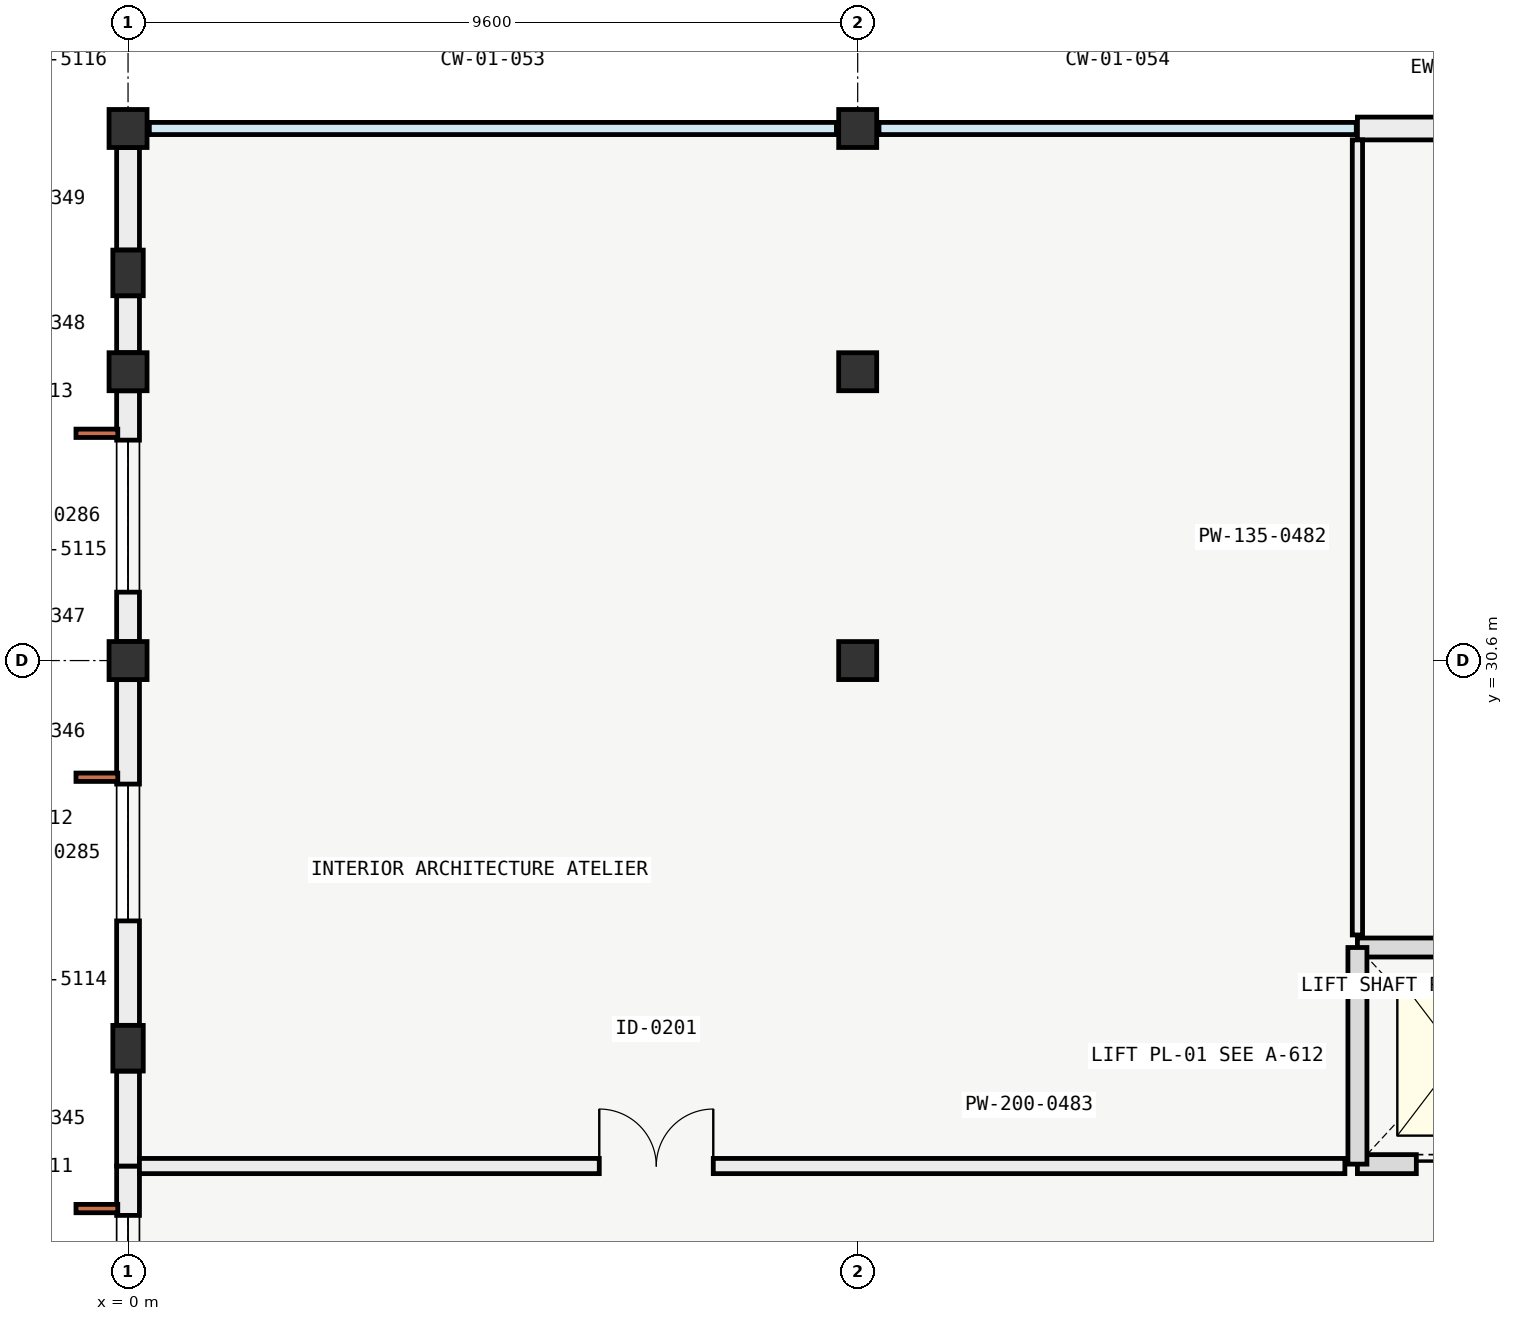
"""IFC4 building model, lengths in metres.
Left out: names, types, materials, properties, quantities, classifications, styles, units other than length and angle.
Written with IfcOpenShell. Run it as: python <this file> out.ifc"""

import sys

from ifc_helpers import new_model, si_unit, direction, frame, frame_2d, origin, origin_2d, place, context, subcontext, project, spatial, rectangle, extrude, element, fill, save


model = new_model("IFC4")
c1 = context("Model", 3, precision=1e-05, world=origin(), true_north=direction((0.0, 1.0)))
c2 = subcontext(c1, "Body", "Model", "MODEL_VIEW")
j1 = project(units=[si_unit("LENGTHUNIT", "METRE"), si_unit("PLANEANGLEUNIT", "RADIAN")], contexts=[c1])
p1 = place(None, origin())
s1 = spatial("IfcSite", under=j1, at=p1, CompositionType="ELEMENT")
p2 = place(p1, origin())
s2 = spatial("IfcBuilding", under=s1, at=p2, CompositionType="ELEMENT")
p3 = place(p2, frame((0.0, 0.0, 26.4)))
s3 = spatial("IfcBuildingStorey", under=s2, at=p3, CompositionType="ELEMENT", Elevation=26.4)
for number, where, z_axis, x_axis in (
    (1, (0.0, 30.6, 0.0), (0.0, 0.0, 1.0), (1.0, 0.0, 0.0)),
    (2, (0.0, 34.4, 0.0), (0.0, 0.0, 1.0), (1.0, 0.0, 0.0)),
    (3, (0.0, 37.6, 0.0), (0.0, 0.0, 1.0), (1.0, 0.0, 0.0)),
    (4, (9.6, 30.6, 0.0), (0.0, 0.0, 1.0), (1.0, 0.0, 0.0)),
    (5, (9.6, 34.4, 0.0), (0.0, 0.0, 1.0), (1.0, 0.0, 0.0)),
    (6, (9.6, 37.6, 0.0), (0.0, 0.0, 1.0), (1.0, 0.0, 0.0)),
):
    element("IfcColumn", number, at=place(p3, frame(where, z_axis=z_axis, x_axis=x_axis)), inside=s3, PredefinedType="COLUMN", context=c2, shape_type="SweptSolid", body=[
        extrude(rectangle(XDim=0.5, YDim=0.5, at=origin_2d()), origin(), (0.0, 0.0, 1.0), 4.2),
    ])
for number, where, z_axis, x_axis in (
    (7, (0.0, 25.5, 0.0), (0.0, 0.0, 1.0), (1.0, 0.0, 0.0)),
    (8, (0.0, 35.7, 0.0), (0.0, 0.0, 1.0), (1.0, 0.0, 0.0)),
):
    element("IfcColumn", number, at=place(p3, frame(where, z_axis=z_axis, x_axis=x_axis)), inside=s3, PredefinedType="PILASTER", context=c2, shape_type="SweptSolid", body=[
        extrude(rectangle(XDim=0.4, YDim=0.6, at=origin_2d()), origin(), (0.0, 0.0, 1.0), 4.2),
    ])
p4 = place(p3, frame((0.0, 20.651, 0.0), z_axis=(0.0, 0.0, 1.0), x_axis=(0.0, 1.0, 0.0)))
e9 = element("IfcWall", 9, at=p4, inside=s3, PredefinedType="SOLIDWALL", context=c2, shape_type="SweptSolid", body=[
    extrude(rectangle(XDim=3.299, YDim=0.3, at=frame_2d((1.649, 0.0))), origin(), (0.0, 0.0, 1.0), 3.25),
])
p5 = place(p4, frame((0.649, 0.0, 0.75)))
e10 = element("IfcOpeningElement", 10, at=p5, cuts=e9, PredefinedType="OPENING", context=c2, shape_type="SweptSolid", body=[
    extrude(rectangle(XDim=2.0, YDim=1.35, at=frame_2d((1.0, 0.675))), frame((0.0, 0.16, 0.0), z_axis=(0.0, -1.0, 0.0), x_axis=(1.0, 0.0, 0.0)), (0.0, 0.0, 1.0), 0.32),
])
p6 = place(p3, frame((0.0, 23.95, 0.0), z_axis=(0.0, 0.0, 1.0), x_axis=(0.0, 1.0, 0.0)))
e11 = element("IfcWall", 11, at=p6, inside=s3, PredefinedType="SOLIDWALL", context=c2, shape_type="SweptSolid", body=[
    extrude(rectangle(XDim=1.249, YDim=0.3, at=frame_2d((0.625, 0.0))), origin(), (0.0, 0.0, 1.0), 3.25),
])
p7 = place(p3, frame((0.0, 25.801, 0.0), z_axis=(0.0, 0.0, 1.0), x_axis=(0.0, 1.0, 0.0)))
e12 = element("IfcWall", 12, at=p7, inside=s3, PredefinedType="SOLIDWALL", context=c2, shape_type="SweptSolid", body=[
    extrude(rectangle(XDim=4.548, YDim=0.3, at=frame_2d((2.274, 0.0))), origin(), (0.0, 0.0, 1.0), 3.25),
])
p8 = place(p7, frame((1.374, 0.0, 0.85)))
e13 = element("IfcOpeningElement", 13, at=p8, cuts=e12, PredefinedType="OPENING", context=c2, shape_type="SweptSolid", body=[
    extrude(rectangle(XDim=1.8, YDim=2.1, at=frame_2d((0.9, 1.05))), frame((0.0, 0.16, 0.0), z_axis=(0.0, -1.0, 0.0), x_axis=(1.0, 0.0, 0.0)), (0.0, 0.0, 1.0), 0.32),
])
p9 = place(p3, frame((0.0, 30.851, 0.0), z_axis=(0.0, 0.0, 1.0), x_axis=(0.0, 1.0, 0.0)))
e14 = element("IfcWall", 14, at=p9, inside=s3, PredefinedType="SOLIDWALL", context=c2, shape_type="SweptSolid", body=[
    extrude(rectangle(XDim=3.298, YDim=0.3, at=frame_2d((1.649, 0.0))), origin(), (0.0, 0.0, 1.0), 2.355),
])
p10 = place(p9, frame((0.649, 0.0, 0.85)))
e15 = element("IfcOpeningElement", 15, at=p10, cuts=e14, PredefinedType="OPENING", context=c2, shape_type="SweptSolid", body=[
    extrude(rectangle(XDim=2.0, YDim=1.35, at=frame_2d((1.0, 0.675))), frame((0.0, 0.16, 0.0), z_axis=(0.0, -1.0, 0.0), x_axis=(1.0, 0.0, 0.0)), (0.0, 0.0, 1.0), 0.32),
])
p11 = place(p3, frame((0.0, 34.651, 0.0), z_axis=(0.0, 0.0, 1.0), x_axis=(0.0, 1.0, 0.0)))
e16 = element("IfcWall", 16, at=p11, inside=s3, PredefinedType="SOLIDWALL", context=c2, shape_type="SweptSolid", body=[
    extrude(rectangle(XDim=0.748, YDim=0.3, at=frame_2d((0.374, 0.0))), origin(), (0.0, 0.0, 1.0), 2.355),
])
p12 = place(p3, frame((0.0, 36.001, 0.0), z_axis=(0.0, 0.0, 1.0), x_axis=(0.0, 1.0, 0.0)))
e17 = element("IfcWall", 17, at=p12, inside=s3, PredefinedType="SOLIDWALL", context=c2, shape_type="SweptSolid", body=[
    extrude(rectangle(XDim=1.348, YDim=0.3, at=frame_2d((0.674, 0.0))), origin(), (0.0, 0.0, 1.0), 2.355),
])
p13 = place(p3, frame((16.175, 37.6, 0.0), z_axis=(0.0, 0.0, 1.0), x_axis=(1.0, 0.0, 0.0)))
e18 = element("IfcWall", 18, at=p13, inside=s3, PredefinedType="SOLIDWALL", context=c2, shape_type="SweptSolid", body=[
    extrude(rectangle(XDim=2.774, YDim=0.3, at=frame_2d((1.387, 0.0))), origin(), (0.0, 0.0, 1.0), 2.355),
])
p14 = place(p3, frame((16.175, 23.975, 0.0), z_axis=(0.0, 0.0, 1.0), x_axis=(1.0, 0.0, 0.0)))
e19 = element("IfcWall", 19, at=p14, inside=s3, PredefinedType="SOLIDWALL", context=c2, shape_type="SweptSolid", body=[
    extrude(rectangle(XDim=2.65, YDim=0.25, at=frame_2d((1.325, 0.0))), origin(), (0.0, 0.0, 1.0), 3.975),
])
p15 = place(p14, frame((0.775, 0.0, 0.0)))
e20 = element("IfcOpeningElement", 20, at=p15, cuts=e19, PredefinedType="OPENING", context=c2, shape_type="SweptSolid", body=[
    extrude(rectangle(XDim=1.1, YDim=2.1, at=frame_2d((0.55, 1.05))), frame((0.0, 0.135, 0.0), z_axis=(0.0, -1.0, 0.0), x_axis=(1.0, 0.0, 0.0)), (0.0, 0.0, 1.0), 0.27),
])
p16 = place(p3, frame((18.825, 26.825, 0.0), z_axis=(0.0, 0.0, 1.0), x_axis=(-1.0, 0.0, 0.0)))
e21 = element("IfcWall", 21, at=p16, inside=s3, PredefinedType="SOLIDWALL", context=c2, shape_type="SweptSolid", body=[
    extrude(rectangle(XDim=2.65, YDim=0.25, at=frame_2d((1.325, 0.0))), origin(), (0.0, 0.0, 1.0), 3.975),
])
p17 = place(p3, frame((16.175, 26.825, 0.0), z_axis=(0.0, 0.0, 1.0), x_axis=(0.0, -1.0, 0.0)))
e22 = element("IfcWall", 22, at=p17, inside=s3, PredefinedType="SOLIDWALL", context=c2, shape_type="SweptSolid", body=[
    extrude(rectangle(XDim=2.85, YDim=0.25, at=frame_2d((1.425, 0.0))), origin(), (0.0, 0.0, 1.0), 3.975),
])
p18 = place(p3, frame((16.175, 26.99, 0.0), z_axis=(0.0, 0.0, 1.0), x_axis=(0.0, 1.0, 0.0)))
e23 = element("IfcWall", 23, at=p18, inside=s3, PredefinedType="PARTITIONING", context=c2, shape_type="SweptSolid", body=[
    extrude(rectangle(XDim=10.46, YDim=0.135, at=frame_2d((5.23, 0.0))), origin(), (0.0, 0.0, 1.0), 3.305),
])
p19 = place(p3, frame((0.15, 23.95, 0.0), z_axis=(0.0, 0.0, 1.0), x_axis=(1.0, 0.0, 0.0)))
e24 = element("IfcWall", 24, at=p19, inside=s3, PredefinedType="PARTITIONING", context=c2, shape_type="SweptSolid", body=[
    extrude(rectangle(XDim=15.86, YDim=0.2, at=frame_2d((7.93, 0.0))), origin(), (0.0, 0.0, 1.0), 3.305),
])
p20 = place(p19, frame((6.05, 0.0, 0.0)))
e25 = element("IfcOpeningElement", 25, at=p20, cuts=e24, PredefinedType="OPENING", context=c2, shape_type="SweptSolid", body=[
    extrude(rectangle(XDim=1.5, YDim=2.2, at=frame_2d((0.75, 1.1))), frame((0.0, 0.11, 0.0), z_axis=(0.0, -1.0, 0.0), x_axis=(1.0, 0.0, 0.0)), (0.0, 0.0, 1.0), 0.22),
])
p21 = place(p5, origin())
e26 = element("IfcWindow", 26, at=p21, inside=s3, PartitioningType="SINGLE_PANEL", PredefinedType="WINDOW", context=c2, shape_type="SweptSolid", body=[
    extrude(rectangle(XDim=2.0, YDim=1.35, at=frame_2d((1.0, 0.675))), frame((0.0, 0.03, 0.0), z_axis=(0.0, -1.0, 0.0), x_axis=(1.0, 0.0, 0.0)), (0.0, 0.0, 1.0), 0.06),
])
fill(e10, e26)
p22 = place(p8, origin())
e27 = element("IfcWindow", 27, at=p22, inside=s3, PartitioningType="SINGLE_PANEL", PredefinedType="WINDOW", context=c2, shape_type="SweptSolid", body=[
    extrude(rectangle(XDim=1.8, YDim=2.1, at=frame_2d((0.9, 1.05))), frame((0.0, 0.03, 0.0), z_axis=(0.0, -1.0, 0.0), x_axis=(1.0, 0.0, 0.0)), (0.0, 0.0, 1.0), 0.06),
])
fill(e13, e27)
p23 = place(p10, origin())
e28 = element("IfcWindow", 28, at=p23, inside=s3, PartitioningType="SINGLE_PANEL", PredefinedType="WINDOW", context=c2, shape_type="SweptSolid", body=[
    extrude(rectangle(XDim=2.0, YDim=1.35, at=frame_2d((1.0, 0.675))), frame((0.0, 0.03, 0.0), z_axis=(0.0, -1.0, 0.0), x_axis=(1.0, 0.0, 0.0)), (0.0, 0.0, 1.0), 0.06),
])
fill(e15, e28)
p24 = place(p15, origin())
e29 = element("IfcDoor", 29, at=p24, inside=s3, OperationType="SLIDING_TO_LEFT", PredefinedType="DOOR", context=c2, shape_type="SweptSolid", body=[
    extrude(rectangle(XDim=1.1, YDim=2.1, at=frame_2d((0.55, 1.05))), frame((0.0, 0.025, 0.0), z_axis=(0.0, -1.0, 0.0), x_axis=(1.0, 0.0, 0.0)), (0.0, 0.0, 1.0), 0.05),
])
fill(e20, e29)
p25 = place(p20, origin())
e30 = element("IfcDoor", 30, at=p25, inside=s3, OperationType="DOUBLE_DOOR_SINGLE_SWING", PredefinedType="DOOR", context=c2, shape_type="SweptSolid", body=[
    extrude(rectangle(XDim=1.5, YDim=2.2, at=frame_2d((0.75, 1.1))), frame((0.0, 0.025, 0.0), z_axis=(0.0, -1.0, 0.0), x_axis=(1.0, 0.0, 0.0)), (0.0, 0.0, 1.0), 0.05),
])
fill(e25, e30)
save(model, sys.argv[1])
